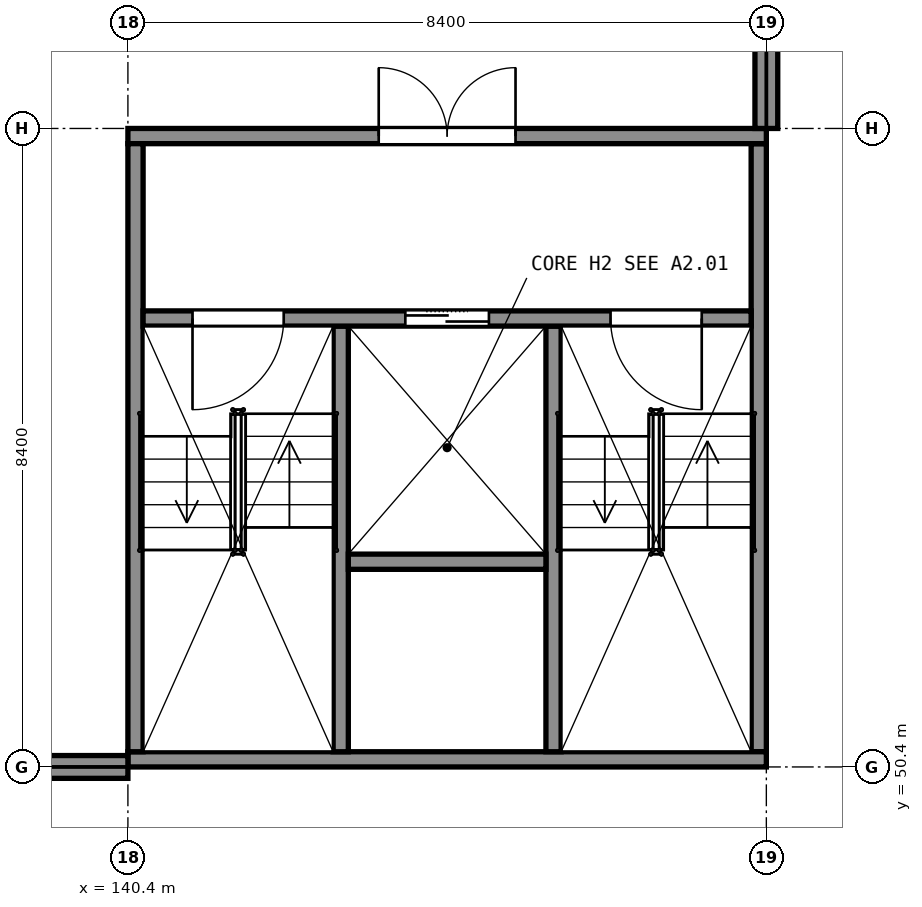
"""IFC4 building model, lengths in metres.
Left out: names, types, materials, properties, quantities, classifications, styles, units other than length and angle.
Written with IfcOpenShell. Run it as: python <this file> out.ifc"""

import sys

from ifc_helpers import new_model, si_unit, direction, frame, frame_2d, origin, place, context, subcontext, project, spatial, rectangle, extrude, element, fill, save


model = new_model("IFC4")
c1 = context("Model", 3, precision=1e-05, world=origin(), true_north=direction((0.0, 1.0)))
c2 = subcontext(c1, "Body", "Model", "MODEL_VIEW")
j1 = project(units=[si_unit("LENGTHUNIT", "METRE"), si_unit("PLANEANGLEUNIT", "RADIAN")], contexts=[c1])
p1 = place(None, origin())
s1 = spatial("IfcSite", under=j1, at=p1, CompositionType="ELEMENT")
p2 = place(p1, origin())
s2 = spatial("IfcBuilding", under=s1, at=p2, CompositionType="ELEMENT")
p3 = place(p2, frame((0.0, 0.0, 20.0)))
s3 = spatial("IfcBuildingStorey", under=s2, at=p3, CompositionType="ELEMENT", Elevation=20.0)
p4 = place(p3, frame((140.4, 50.5, 0.0), z_axis=(0.0, 0.0, 1.0), x_axis=(1.0, 0.0, 0.0)))
e1 = element("IfcWall", 1, at=p4, inside=s3, PredefinedType="SHEAR", context=c2, shape_type="SweptSolid", body=[
    extrude(rectangle(XDim=8.4, YDim=0.2, at=frame_2d((4.2, 0.0))), origin(), (0.0, 0.0, 1.0), 5.0),
])
p5 = place(p3, frame((140.4, 58.7, 0.0), z_axis=(0.0, 0.0, 1.0), x_axis=(1.0, 0.0, 0.0)))
e2 = element("IfcWall", 2, at=p5, inside=s3, PredefinedType="SHEAR", context=c2, shape_type="SweptSolid", body=[
    extrude(rectangle(XDim=8.4, YDim=0.2, at=frame_2d((4.2, 0.0))), origin(), (0.0, 0.0, 1.0), 5.0),
])
p6 = place(p5, frame((3.3, 0.0, 0.0)))
e3 = element("IfcOpeningElement", 3, at=p6, cuts=e2, PredefinedType="OPENING", context=c2, shape_type="SweptSolid", body=[
    extrude(rectangle(XDim=1.8, YDim=2.1, at=frame_2d((0.9, 1.05))), frame((0.0, 0.11, 0.0), z_axis=(0.0, -1.0, 0.0), x_axis=(1.0, 0.0, 0.0)), (0.0, 0.0, 1.0), 0.22),
])
for number, where, z_axis, x_axis in (
    (4, (140.5, 50.6, 0.0), (0.0, 0.0, 1.0), (0.0, 1.0, 0.0)),
    (5, (148.7, 50.6, 0.0), (0.0, 0.0, 1.0), (0.0, 1.0, 0.0)),
):
    element("IfcWall", number, at=place(p3, frame(where, z_axis=z_axis, x_axis=x_axis)), inside=s3, PredefinedType="SHEAR", context=c2, shape_type="SweptSolid", body=[
        extrude(rectangle(XDim=8.0, YDim=0.2, at=frame_2d((4.0, 0.0))), origin(), (0.0, 0.0, 1.0), 5.0),
    ])
p7 = place(p3, frame((140.6, 56.3, 0.0), z_axis=(0.0, 0.0, 1.0), x_axis=(1.0, 0.0, 0.0)))
e6 = element("IfcWall", 6, at=p7, inside=s3, PredefinedType="SHEAR", context=c2, shape_type="SweptSolid", body=[
    extrude(rectangle(XDim=8.0, YDim=0.2, at=frame_2d((4.0, 0.0))), origin(), (0.0, 0.0, 1.0), 5.0),
])
p8 = place(p7, frame((0.65, 0.0, 0.0)))
e7 = element("IfcOpeningElement", 7, at=p8, cuts=e6, PredefinedType="OPENING", context=c2, shape_type="SweptSolid", body=[
    extrude(rectangle(XDim=1.2, YDim=2.1, at=frame_2d((0.6, 1.05))), frame((0.0, 0.11, 0.0), z_axis=(0.0, -1.0, 0.0), x_axis=(1.0, 0.0, 0.0)), (0.0, 0.0, 1.0), 0.22),
])
p9 = place(p7, frame((6.15, 0.0, 0.0)))
e8 = element("IfcOpeningElement", 8, at=p9, cuts=e6, PredefinedType="OPENING", context=c2, shape_type="SweptSolid", body=[
    extrude(rectangle(XDim=1.2, YDim=2.1, at=frame_2d((0.6, 1.05))), frame((0.0, 0.11, 0.0), z_axis=(0.0, -1.0, 0.0), x_axis=(1.0, 0.0, 0.0)), (0.0, 0.0, 1.0), 0.22),
])
p10 = place(p7, frame((3.45, 0.0, 0.0)))
e9 = element("IfcOpeningElement", 9, at=p10, cuts=e6, PredefinedType="OPENING", context=c2, shape_type="SweptSolid", body=[
    extrude(rectangle(XDim=1.1, YDim=2.1, at=frame_2d((0.55, 1.05))), frame((0.0, 0.11, 0.0), z_axis=(0.0, -1.0, 0.0), x_axis=(1.0, 0.0, 0.0)), (0.0, 0.0, 1.0), 0.22),
])
for number, where, z_axis, x_axis in (
    (10, (143.2, 50.6, 0.0), (0.0, 0.0, 1.0), (0.0, 1.0, 0.0)),
    (11, (146.0, 50.6, 0.0), (0.0, 0.0, 1.0), (0.0, 1.0, 0.0)),
):
    element("IfcWall", number, at=place(p3, frame(where, z_axis=z_axis, x_axis=x_axis)), inside=s3, PredefinedType="SHEAR", context=c2, shape_type="SweptSolid", body=[
        extrude(rectangle(XDim=5.6, YDim=0.2, at=frame_2d((2.8, 0.0))), origin(), (0.0, 0.0, 1.0), 5.0),
    ])
p11 = place(p3, frame((143.3, 53.1, 0.0), z_axis=(0.0, 0.0, 1.0), x_axis=(1.0, 0.0, 0.0)))
e12 = element("IfcWall", 12, at=p11, inside=s3, PredefinedType="SHEAR", context=c2, shape_type="SweptSolid", body=[
    extrude(rectangle(XDim=2.6, YDim=0.2, at=frame_2d((1.3, 0.0))), origin(), (0.0, 0.0, 1.0), 5.0),
])
p12 = place(p3, frame((132.35, 50.4, 0.0), z_axis=(0.0, 0.0, 1.0), x_axis=(1.0, 0.0, 0.0)))
e13 = element("IfcWall", 13, at=p12, inside=s3, PredefinedType="SOLIDWALL", context=c2, shape_type="SweptSolid", body=[
    extrude(rectangle(XDim=8.05, YDim=0.3, at=frame_2d((4.025, 0.0))), origin(), (0.0, 0.0, 1.0), 3.94),
])
p13 = place(p3, frame((148.8, 58.8, 0.0), z_axis=(0.0, 0.0, 1.0), x_axis=(0.0, 1.0, 0.0)))
e14 = element("IfcWall", 14, at=p13, inside=s3, PredefinedType="SOLIDWALL", context=c2, shape_type="SweptSolid", body=[
    extrude(rectangle(XDim=8.05, YDim=0.3, at=frame_2d((4.025, 0.0))), origin(), (0.0, 0.0, 1.0), 2.242),
])
p14 = place(p6, origin())
e15 = element("IfcDoor", 15, at=p14, inside=s3, OperationType="DOUBLE_DOOR_SINGLE_SWING", PredefinedType="DOOR", context=c2, shape_type="SweptSolid", body=[
    extrude(rectangle(XDim=1.8, YDim=2.1, at=frame_2d((0.9, 1.05))), frame((0.0, 0.025, 0.0), z_axis=(0.0, -1.0, 0.0), x_axis=(1.0, 0.0, 0.0)), (0.0, 0.0, 1.0), 0.05),
])
fill(e3, e15)
p15 = place(p8, origin())
e16 = element("IfcDoor", 16, at=p15, inside=s3, OperationType="SINGLE_SWING_LEFT", PredefinedType="DOOR", context=c2, shape_type="SweptSolid", body=[
    extrude(rectangle(XDim=1.2, YDim=2.1, at=frame_2d((0.6, 1.05))), frame((0.0, 0.025, 0.0), z_axis=(0.0, -1.0, 0.0), x_axis=(1.0, 0.0, 0.0)), (0.0, 0.0, 1.0), 0.05),
])
fill(e7, e16)
p16 = place(p9, origin())
e17 = element("IfcDoor", 17, at=p16, inside=s3, OperationType="SINGLE_SWING_RIGHT", PredefinedType="DOOR", context=c2, shape_type="SweptSolid", body=[
    extrude(rectangle(XDim=1.2, YDim=2.1, at=frame_2d((0.6, 1.05))), frame((0.0, 0.025, 0.0), z_axis=(0.0, -1.0, 0.0), x_axis=(1.0, 0.0, 0.0)), (0.0, 0.0, 1.0), 0.05),
])
fill(e8, e17)
p17 = place(p10, origin())
e18 = element("IfcDoor", 18, at=p17, inside=s3, OperationType="DOUBLE_DOOR_SLIDING", PredefinedType="DOOR", context=c2, shape_type="SweptSolid", body=[
    extrude(rectangle(XDim=1.1, YDim=2.1, at=frame_2d((0.55, 1.05))), frame((0.0, 0.025, 0.0), z_axis=(0.0, -1.0, 0.0), x_axis=(1.0, 0.0, 0.0)), (0.0, 0.0, 1.0), 0.05),
])
fill(e9, e18)
save(model, sys.argv[1])
